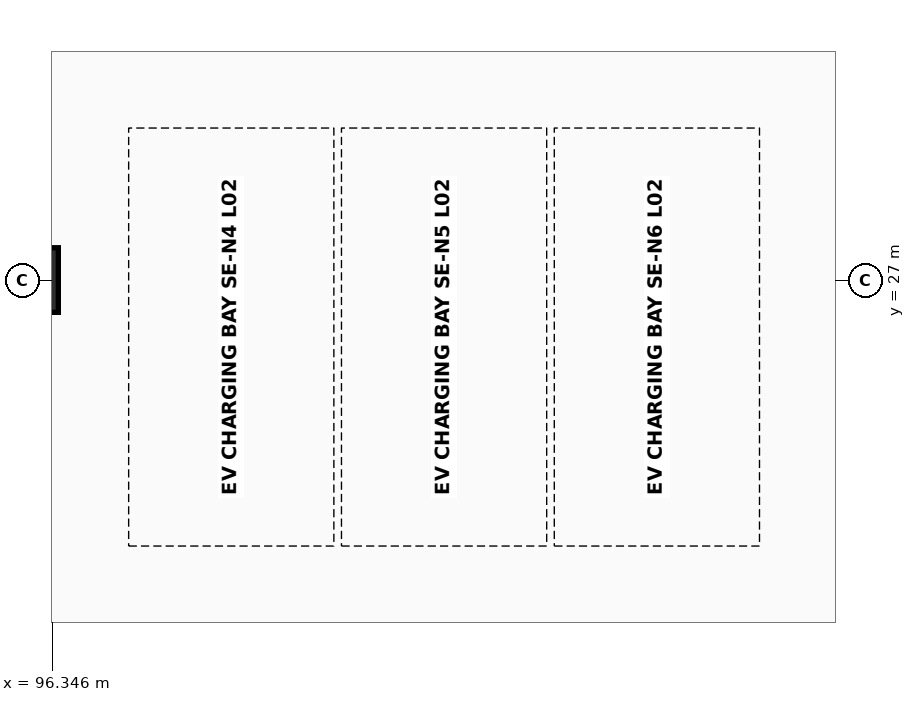
"""IFC4 building model, lengths in metres.
Left out: names, types, materials, properties, quantities, classifications, styles, units other than length and angle.
Written with IfcOpenShell. Run it as: python <this file> out.ifc"""

import sys

from ifc_helpers import new_model, si_unit, direction, frame, origin, origin_2d, place, context, subcontext, project, spatial, rectangle, extrude, element, save


model = new_model("IFC4")
c1 = context("Model", 3, precision=1e-05, world=origin(), true_north=direction((0.0, 1.0)))
c2 = subcontext(c1, "Body", "Model", "MODEL_VIEW")
j1 = project(units=[si_unit("LENGTHUNIT", "METRE"), si_unit("PLANEANGLEUNIT", "RADIAN")], contexts=[c1])
p1 = place(None, origin())
s1 = spatial("IfcSite", under=j1, at=p1, CompositionType="ELEMENT")
p2 = place(p1, origin())
s2 = spatial("IfcBuilding", under=s1, at=p2, CompositionType="ELEMENT")
p3 = place(p2, frame((0.0, 0.0, 9.6)))
s3 = spatial("IfcBuildingStorey", under=s2, at=p3, CompositionType="ELEMENT", Elevation=9.6)
p4 = place(p3, frame((96.0, 27.0, 0.0), z_axis=(0.0, 0.0, 1.0), x_axis=(1.0, 0.0, 0.0)))
e1 = element("IfcColumn", 1, at=p4, inside=s3, PredefinedType="COLUMN", context=c2, shape_type="SweptSolid", body=[
    extrude(rectangle(XDim=0.85, YDim=0.85, at=origin_2d()), origin(), (0.0, 0.0, 1.0), 3.8),
])
save(model, sys.argv[1])
